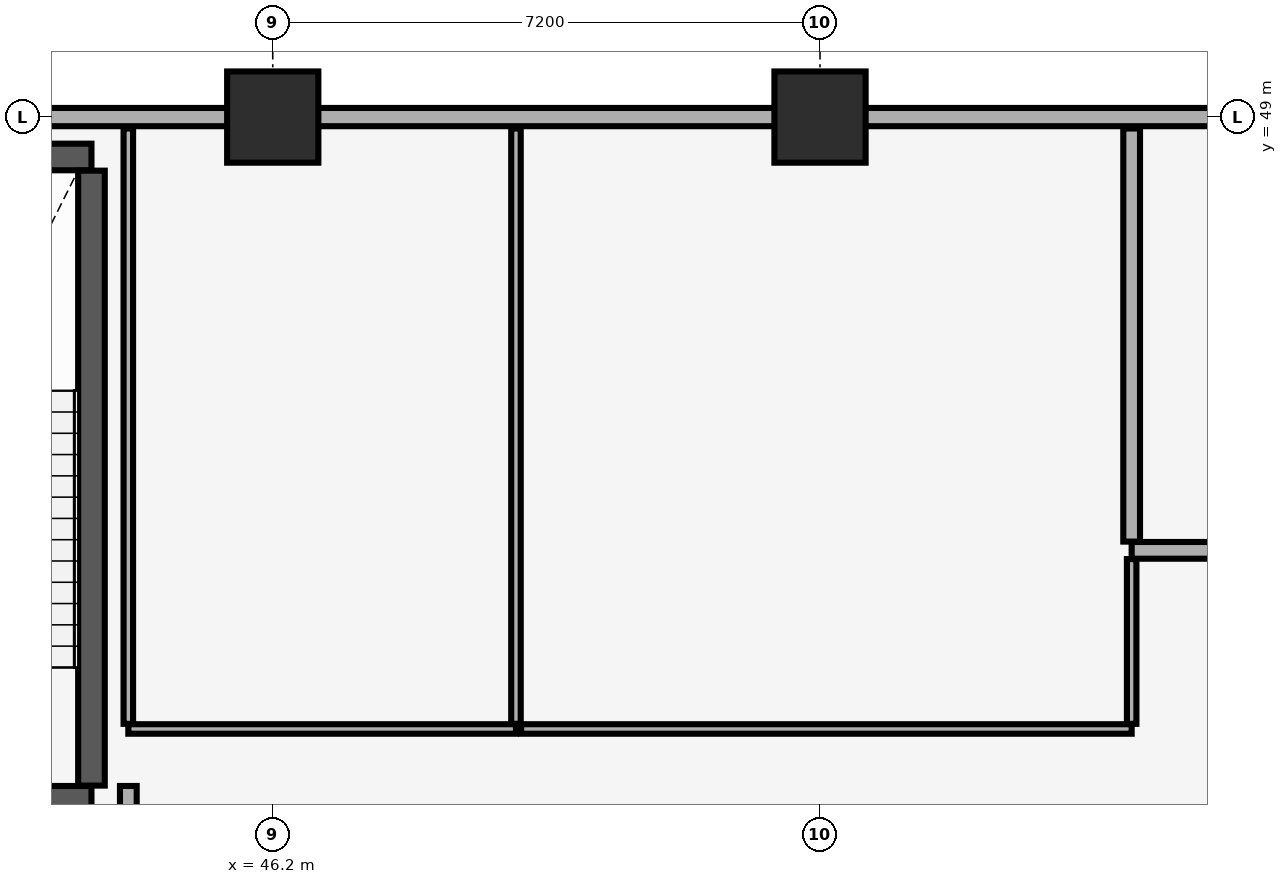
"""IFC4 building model, lengths in metres.
Left out: names, types, materials, properties, quantities, classifications, styles, units other than length and angle.
Written with IfcOpenShell. Run it as: python <this file> out.ifc"""

import sys

from ifc_helpers import new_model, si_unit, direction, frame, frame_2d, origin, origin_2d, place, context, subcontext, project, spatial, rectangle, extrude, element, fill, save


model = new_model("IFC4")
c1 = context("Model", 3, precision=1e-05, world=origin(), true_north=direction((0.0, 1.0)))
c2 = subcontext(c1, "Body", "Model", "MODEL_VIEW")
j1 = project(units=[si_unit("LENGTHUNIT", "METRE"), si_unit("PLANEANGLEUNIT", "RADIAN")], contexts=[c1])
p1 = place(None, origin())
s1 = spatial("IfcSite", under=j1, at=p1, CompositionType="ELEMENT")
p2 = place(p1, origin())
s2 = spatial("IfcBuilding", under=s1, at=p2, CompositionType="ELEMENT")
p3 = place(p2, frame((0.0, 0.0, 224.35)))
s3 = spatial("IfcBuildingStorey", under=s2, at=p3, CompositionType="ELEMENT", Elevation=224.35)
for number, where, z_axis, x_axis in (
    (1, (46.2, 49.0, 0.0), (0.0, 0.0, 1.0), (1.0, 0.0, 0.0)),
    (2, (53.4, 49.0, 0.0), (0.0, 0.0, 1.0), (1.0, 0.0, 0.0)),
):
    element("IfcColumn", number, at=place(p3, frame(where, z_axis=z_axis, x_axis=x_axis)), inside=s3, PredefinedType="COLUMN", context=c2, shape_type="SweptSolid", body=[
        extrude(rectangle(XDim=1.2, YDim=1.2, at=origin_2d()), origin(), (0.0, 0.0, 1.0), 4.56),
    ])
p4 = place(p3, frame((77.0, 49.0, 0.0), z_axis=(0.0, 0.0, 1.0), x_axis=(-1.0, 0.0, 0.0)))
e3 = element("IfcWall", 3, at=p4, inside=s3, PredefinedType="SOLIDWALL", context=c2, shape_type="SweptSolid", body=[
    extrude(rectangle(XDim=70.0, YDim=0.24, at=frame_2d((35.0, 0.0))), origin(), (0.0, 0.0, 1.0), 3.4),
])
p5 = place(p4, frame((62.975, 0.0, 0.85)))
e4 = element("IfcOpeningElement", 4, at=p5, cuts=e3, PredefinedType="OPENING", context=c2, shape_type="SweptSolid", body=[
    extrude(rectangle(XDim=3.0, YDim=1.5, at=frame_2d((1.5, 0.75))), frame((0.0, 0.13, 0.0), z_axis=(0.0, -1.0, 0.0), x_axis=(1.0, 0.0, 0.0)), (0.0, 0.0, 1.0), 0.26),
])
p6 = place(p4, frame((4.025, 0.0, 0.85)))
e5 = element("IfcOpeningElement", 5, at=p6, cuts=e3, PredefinedType="OPENING", context=c2, shape_type="SweptSolid", body=[
    extrude(rectangle(XDim=3.0, YDim=1.5, at=frame_2d((1.5, 0.75))), frame((0.0, 0.13, 0.0), z_axis=(0.0, -1.0, 0.0), x_axis=(1.0, 0.0, 0.0)), (0.0, 0.0, 1.0), 0.26),
])
p7 = place(p4, frame((49.465, 0.0, 0.9)))
e6 = element("IfcOpeningElement", 6, at=p7, cuts=e3, PredefinedType="OPENING", context=c2, shape_type="SweptSolid", body=[
    extrude(rectangle(XDim=1.5, YDim=1.4, at=frame_2d((0.75, 0.7))), frame((0.0, 0.13, 0.0), z_axis=(0.0, -1.0, 0.0), x_axis=(1.0, 0.0, 0.0)), (0.0, 0.0, 1.0), 0.26),
])
p8 = place(p4, frame((41.65, 0.0, 0.9)))
e7 = element("IfcOpeningElement", 7, at=p8, cuts=e3, PredefinedType="OPENING", context=c2, shape_type="SweptSolid", body=[
    extrude(rectangle(XDim=3.6, YDim=1.5, at=frame_2d((1.8, 0.75))), frame((0.0, 0.13, 0.0), z_axis=(0.0, -1.0, 0.0), x_axis=(1.0, 0.0, 0.0)), (0.0, 0.0, 1.0), 0.26),
])
p9 = place(p4, frame((28.25, 0.0, 0.9)))
e8 = element("IfcOpeningElement", 8, at=p9, cuts=e3, PredefinedType="OPENING", context=c2, shape_type="SweptSolid", body=[
    extrude(rectangle(XDim=1.5, YDim=1.4, at=frame_2d((0.75, 0.7))), frame((0.0, 0.13, 0.0), z_axis=(0.0, -1.0, 0.0), x_axis=(1.0, 0.0, 0.0)), (0.0, 0.0, 1.0), 0.26),
])
p10 = place(p4, frame((24.6, 0.0, 0.9)))
e9 = element("IfcOpeningElement", 9, at=p10, cuts=e3, PredefinedType="OPENING", context=c2, shape_type="SweptSolid", body=[
    extrude(rectangle(XDim=2.4, YDim=1.5, at=frame_2d((1.2, 0.75))), frame((0.0, 0.13, 0.0), z_axis=(0.0, -1.0, 0.0), x_axis=(1.0, 0.0, 0.0)), (0.0, 0.0, 1.0), 0.26),
])
p11 = place(p4, frame((20.235, 0.0, 0.9)))
e10 = element("IfcOpeningElement", 10, at=p11, cuts=e3, PredefinedType="OPENING", context=c2, shape_type="SweptSolid", body=[
    extrude(rectangle(XDim=2.4, YDim=1.5, at=frame_2d((1.2, 0.75))), frame((0.0, 0.13, 0.0), z_axis=(0.0, -1.0, 0.0), x_axis=(1.0, 0.0, 0.0)), (0.0, 0.0, 1.0), 0.26),
])
p12 = place(p3, frame((40.185, 40.025, 0.0), z_axis=(0.0, 0.0, 1.0), x_axis=(1.0, 0.0, 0.0)))
e11 = element("IfcWall", 11, at=p12, inside=s3, PredefinedType="SHEAR", context=c2, shape_type="SweptSolid", body=[
    extrude(rectangle(XDim=3.63, YDim=0.35, at=frame_2d((1.815, 0.0))), origin(), (0.0, 0.0, 1.0), 4.52),
])
p13 = place(p12, frame((1.24, 0.0, 0.0)))
e12 = element("IfcOpeningElement", 12, at=p13, cuts=e11, PredefinedType="OPENING", context=c2, shape_type="SweptSolid", body=[
    extrude(rectangle(XDim=1.15, YDim=2.15, at=frame_2d((0.575, 1.075))), frame((0.0, 0.185, 0.0), z_axis=(0.0, -1.0, 0.0), x_axis=(1.0, 0.0, 0.0)), (0.0, 0.0, 1.0), 0.37),
])
p14 = place(p3, frame((40.185, 48.475, 0.0), z_axis=(0.0, 0.0, 1.0), x_axis=(1.0, 0.0, 0.0)))
e13 = element("IfcWall", 13, at=p14, inside=s3, PredefinedType="SHEAR", context=c2, shape_type="SweptSolid", body=[
    extrude(rectangle(XDim=3.63, YDim=0.35, at=frame_2d((1.815, 0.0))), origin(), (0.0, 0.0, 1.0), 4.52),
])
p15 = place(p3, frame((43.815, 40.205, 0.0), z_axis=(0.0, 0.0, 1.0), x_axis=(0.0, 1.0, 0.0)))
e14 = element("IfcWall", 14, at=p15, inside=s3, PredefinedType="SHEAR", context=c2, shape_type="SweptSolid", body=[
    extrude(rectangle(XDim=8.09, YDim=0.35, at=frame_2d((4.045, 0.0))), origin(), (0.0, 0.0, 1.0), 4.52),
])
p16 = place(p3, frame((44.3, 34.415, 0.0), z_axis=(0.0, 0.0, 1.0), x_axis=(0.0, 1.0, 0.0)))
e15 = element("IfcWall", 15, at=p16, inside=s3, PredefinedType="PARTITIONING", context=c2, shape_type="SweptSolid", body=[
    extrude(rectangle(XDim=5.785, YDim=0.22, at=frame_2d((2.893, 0.0))), origin(), (0.0, 0.0, 1.0), 4.52),
])
p17 = place(p3, frame((57.5, 43.3, 0.0), z_axis=(0.0, 0.0, 1.0), x_axis=(1.0, 0.0, 0.0)))
e16 = element("IfcWall", 16, at=p17, inside=s3, PredefinedType="PARTITIONING", context=c2, shape_type="SweptSolid", body=[
    extrude(rectangle(XDim=3.04, YDim=0.22, at=frame_2d((1.52, 0.0))), origin(), (0.0, 0.0, 1.0), 4.52),
])
p18 = place(p17, frame((0.9, 0.0, 0.0)))
e17 = element("IfcOpeningElement", 17, at=p18, cuts=e16, PredefinedType="OPENING", context=c2, shape_type="SweptSolid", body=[
    extrude(rectangle(XDim=1.2, YDim=2.15, at=frame_2d((0.6, 1.075))), frame((0.0, 0.12, 0.0), z_axis=(0.0, -1.0, 0.0), x_axis=(1.0, 0.0, 0.0)), (0.0, 0.0, 1.0), 0.24),
])
p19 = place(p3, frame((57.5, 43.415, 0.0), z_axis=(0.0, 0.0, 1.0), x_axis=(0.0, 1.0, 0.0)))
e18 = element("IfcWall", 18, at=p19, inside=s3, PredefinedType="PARTITIONING", context=c2, shape_type="SweptSolid", body=[
    extrude(rectangle(XDim=5.435, YDim=0.22, at=frame_2d((2.718, 0.0))), origin(), (0.0, 0.0, 1.0), 4.52),
])
p20 = place(p3, frame((44.3, 40.95, 0.0), z_axis=(0.0, 0.0, 1.0), x_axis=(1.0, 0.0, 0.0)))
e19 = element("IfcWall", 19, at=p20, inside=s3, PredefinedType="PARTITIONING", context=c2, shape_type="SweptSolid", body=[
    extrude(rectangle(XDim=5.1, YDim=0.125, at=frame_2d((2.55, 0.0))), origin(), (0.0, 0.0, 1.0), 4.52),
])
p21 = place(p20, frame((2.85, 0.0, 0.0)))
e20 = element("IfcOpeningElement", 20, at=p21, cuts=e19, PredefinedType="OPENING", context=c2, shape_type="SweptSolid", body=[
    extrude(rectangle(XDim=0.9, YDim=2.1, at=frame_2d((0.45, 1.05))), frame((0.0, 0.073, 0.0), z_axis=(0.0, -1.0, 0.0), x_axis=(1.0, 0.0, 0.0)), (0.0, 0.0, 1.0), 0.145),
])
for number, where, z_axis, x_axis in (
    (21, (44.3, 41.018, 0.0), (0.0, 0.0, 1.0), (0.0, 1.0, 0.0)),
    (22, (49.4, 41.018, 0.0), (0.0, 0.0, 1.0), (0.0, 1.0, 0.0)),
):
    element("IfcWall", number, at=place(p3, frame(where, z_axis=z_axis, x_axis=x_axis)), inside=s3, PredefinedType="PARTITIONING", context=c2, shape_type="SweptSolid", body=[
        extrude(rectangle(XDim=7.833, YDim=0.125, at=frame_2d((3.916, 0.0))), origin(), (0.0, 0.0, 1.0), 4.52),
    ])
p22 = place(p3, frame((49.468, 40.95, 0.0), z_axis=(0.0, 0.0, 1.0), x_axis=(1.0, 0.0, 0.0)))
e23 = element("IfcWall", 23, at=p22, inside=s3, PredefinedType="PARTITIONING", context=c2, shape_type="SweptSolid", body=[
    extrude(rectangle(XDim=8.032, YDim=0.125, at=frame_2d((4.016, 0.0))), origin(), (0.0, 0.0, 1.0), 4.52),
])
p23 = place(p22, frame((4.782, 0.0, 0.0)))
e24 = element("IfcOpeningElement", 24, at=p23, cuts=e23, PredefinedType="OPENING", context=c2, shape_type="SweptSolid", body=[
    extrude(rectangle(XDim=0.9, YDim=2.1, at=frame_2d((0.45, 1.05))), frame((0.0, 0.073, 0.0), z_axis=(0.0, -1.0, 0.0), x_axis=(1.0, 0.0, 0.0)), (0.0, 0.0, 1.0), 0.145),
])
p24 = place(p3, frame((57.5, 41.018, 0.0), z_axis=(0.0, 0.0, 1.0), x_axis=(0.0, 1.0, 0.0)))
e25 = element("IfcWall", 25, at=p24, inside=s3, PredefinedType="PARTITIONING", context=c2, shape_type="SweptSolid", body=[
    extrude(rectangle(XDim=2.167, YDim=0.125, at=frame_2d((1.084, 0.0))), origin(), (0.0, 0.0, 1.0), 4.52),
])
p25 = place(p9, origin())
e26 = element("IfcWindow", 26, at=p25, inside=s3, PartitioningType="SINGLE_PANEL", PredefinedType="WINDOW", context=c2, shape_type="SweptSolid", body=[
    extrude(rectangle(XDim=1.5, YDim=1.4, at=frame_2d((0.75, 0.7))), frame((0.0, 0.03, 0.0), z_axis=(0.0, -1.0, 0.0), x_axis=(1.0, 0.0, 0.0)), (0.0, 0.0, 1.0), 0.06),
])
fill(e8, e26)
p26 = place(p10, origin())
e27 = element("IfcWindow", 27, at=p26, inside=s3, PartitioningType="SINGLE_PANEL", PredefinedType="WINDOW", context=c2, shape_type="SweptSolid", body=[
    extrude(rectangle(XDim=2.4, YDim=1.5, at=frame_2d((1.2, 0.75))), frame((0.0, 0.03, 0.0), z_axis=(0.0, -1.0, 0.0), x_axis=(1.0, 0.0, 0.0)), (0.0, 0.0, 1.0), 0.06),
])
fill(e9, e27)
p27 = place(p11, origin())
e28 = element("IfcWindow", 28, at=p27, inside=s3, PartitioningType="SINGLE_PANEL", PredefinedType="WINDOW", context=c2, shape_type="SweptSolid", body=[
    extrude(rectangle(XDim=2.4, YDim=1.5, at=frame_2d((1.2, 0.75))), frame((0.0, 0.03, 0.0), z_axis=(0.0, -1.0, 0.0), x_axis=(1.0, 0.0, 0.0)), (0.0, 0.0, 1.0), 0.06),
])
fill(e10, e28)
p28 = place(p18, origin())
e29 = element("IfcDoor", 29, at=p28, inside=s3, OperationType="SINGLE_SWING_RIGHT", PredefinedType="DOOR", context=c2, shape_type="SweptSolid", body=[
    extrude(rectangle(XDim=1.2, YDim=2.15, at=frame_2d((0.6, 1.075))), frame((0.0, 0.025, 0.0), z_axis=(0.0, -1.0, 0.0), x_axis=(1.0, 0.0, 0.0)), (0.0, 0.0, 1.0), 0.05),
])
fill(e17, e29)
p29 = place(p21, origin())
e30 = element("IfcDoor", 30, at=p29, inside=s3, OperationType="SINGLE_SWING_LEFT", PredefinedType="DOOR", context=c2, shape_type="SweptSolid", body=[
    extrude(rectangle(XDim=0.9, YDim=2.1, at=frame_2d((0.45, 1.05))), frame((0.0, 0.025, 0.0), z_axis=(0.0, -1.0, 0.0), x_axis=(1.0, 0.0, 0.0)), (0.0, 0.0, 1.0), 0.05),
])
fill(e20, e30)
p30 = place(p23, origin())
e31 = element("IfcDoor", 31, at=p30, inside=s3, OperationType="SINGLE_SWING_RIGHT", PredefinedType="DOOR", context=c2, shape_type="SweptSolid", body=[
    extrude(rectangle(XDim=0.9, YDim=2.1, at=frame_2d((0.45, 1.05))), frame((0.0, 0.025, 0.0), z_axis=(0.0, -1.0, 0.0), x_axis=(1.0, 0.0, 0.0)), (0.0, 0.0, 1.0), 0.05),
])
fill(e24, e31)
save(model, sys.argv[1])
